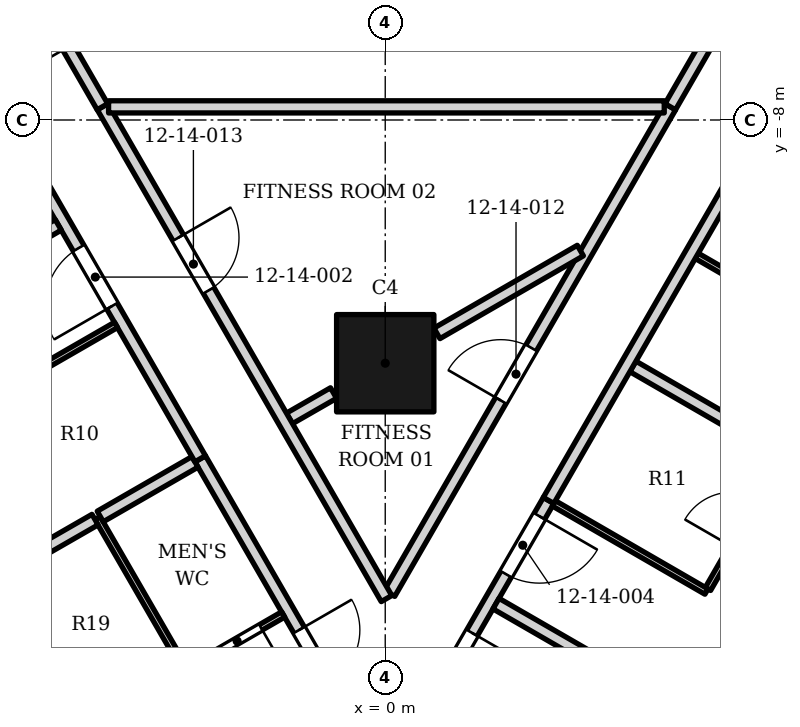
"""IFC4 building model, lengths in metres.
Left out: names, types, materials, properties, quantities, classifications, styles, units other than length and angle.
Written with IfcOpenShell. Run it as: python <this file> out.ifc"""

import sys

from ifc_helpers import new_model, si_unit, direction, frame, frame_2d, origin, origin_2d, place, context, subcontext, project, spatial, rectangle, extrude, element, fill, save


model = new_model("IFC4")
c1 = context("Model", 3, precision=1e-05, world=origin(), true_north=direction((0.0, 1.0)))
c2 = subcontext(c1, "Body", "Model", "MODEL_VIEW")
j1 = project(units=[si_unit("LENGTHUNIT", "METRE"), si_unit("PLANEANGLEUNIT", "RADIAN")], contexts=[c1])
p1 = place(None, origin())
s1 = spatial("IfcSite", under=j1, at=p1, CompositionType="ELEMENT")
p2 = place(p1, origin())
s2 = spatial("IfcBuilding", under=s1, at=p2, CompositionType="ELEMENT")
p3 = place(p2, frame((0.0, 0.0, 66.4)))
s3 = spatial("IfcBuildingStorey", under=s2, at=p3, CompositionType="ELEMENT", Elevation=66.4)
p4 = place(p3, frame((0.0, -12.0, 0.0), z_axis=(0.0, 0.0, 1.0), x_axis=(1.0, 0.0, 0.0)))
e1 = element("IfcColumn", 1, at=p4, inside=s3, PredefinedType="COLUMN", context=c2, shape_type="SweptSolid", body=[
    extrude(rectangle(XDim=1.6, YDim=1.6, at=origin_2d()), origin(), (0.0, 0.0, 1.0), 3.4),
])
p5 = place(p3, frame((0.02, -18.872, 0.0), z_axis=(0.0, 0.0, 1.0), x_axis=(0.500389767685, 0.865800254329, 0.0)))
e2 = element("IfcWall", 2, at=p5, inside=s3, PredefinedType="PARTITIONING", context=c2, shape_type="SweptSolid", body=[
    extrude(rectangle(XDim=5.33, YDim=0.2, at=frame_2d((2.665, 0.0))), origin(), (0.0, 0.0, 1.0), 2.628),
])
p6 = place(p5, frame((3.931, 0.0, 0.0)))
e3 = element("IfcOpeningElement", 3, at=p6, cuts=e2, PredefinedType="OPENING", context=c2, shape_type="SweptSolid", body=[
    extrude(rectangle(XDim=1.1, YDim=2.1, at=frame_2d((0.55, 1.05))), frame((0.0, 0.11, 0.0), z_axis=(0.0, -1.0, 0.0), x_axis=(1.0, 0.0, 0.0)), (0.0, 0.0, 1.0), 0.22),
])
p7 = place(p5, frame((1.715, 0.0, 0.0)))
e4 = element("IfcOpeningElement", 4, at=p7, cuts=e2, PredefinedType="OPENING", context=c2, shape_type="SweptSolid", body=[
    extrude(rectangle(XDim=1.1, YDim=2.1, at=frame_2d((0.55, 1.05))), frame((0.0, 0.11, 0.0), z_axis=(0.0, -1.0, 0.0), x_axis=(1.0, 0.0, 0.0)), (0.0, 0.0, 1.0), 0.22),
])
p8 = place(p3, frame((-6.421, -15.521, 0.0), z_axis=(0.0, 0.0, 1.0), x_axis=(0.499972122318, -0.866041498374, 0.0)))
e5 = element("IfcWall", 5, at=p8, inside=s3, PredefinedType="PARTITIONING", context=c2, shape_type="SweptSolid", body=[
    extrude(rectangle(XDim=2.85, YDim=0.1, at=frame_2d((1.425, 0.0))), origin(), (0.0, 0.0, 1.0), 3.23),
])
p9 = place(p3, frame((-3.042, -13.573, 0.0), z_axis=(0.0, 0.0, 1.0), x_axis=(0.49998522367, -0.866033934735, 0.0)))
e6 = element("IfcWall", 6, at=p9, inside=s3, PredefinedType="PARTITIONING", context=c2, shape_type="SweptSolid", body=[
    extrude(rectangle(XDim=4.397, YDim=0.2, at=frame_2d((2.198, 0.0))), origin(), (0.0, 0.0, 1.0), 3.23),
])
p10 = place(p9, frame((3.25, 0.0, 0.0)))
e7 = element("IfcOpeningElement", 7, at=p10, cuts=e6, PredefinedType="OPENING", context=c2, shape_type="SweptSolid", body=[
    extrude(rectangle(XDim=1.0, YDim=2.1, at=frame_2d((0.5, 1.05))), frame((0.0, 0.11, 0.0), z_axis=(0.0, -1.0, 0.0), x_axis=(1.0, 0.0, 0.0)), (0.0, 0.0, 1.0), 0.22),
])
p11 = place(p3, frame((-3.281, -17.056, 0.0), z_axis=(0.0, 0.0, 1.0), x_axis=(0.866058118026, 0.49994333299, 0.0)))
e8 = element("IfcWall", 8, at=p11, inside=s3, PredefinedType="PARTITIONING", context=c2, shape_type="SweptSolid", body=[
    extrude(rectangle(XDim=1.85, YDim=0.1, at=frame_2d((0.925, 0.0))), origin(), (0.0, 0.0, 1.0), 3.23),
])
p12 = place(p11, frame((0.525, 0.0, 0.0)))
e9 = element("IfcOpeningElement", 9, at=p12, cuts=e8, PredefinedType="OPENING", context=c2, shape_type="SweptSolid", body=[
    extrude(rectangle(XDim=0.9, YDim=2.1, at=frame_2d((0.45, 1.05))), frame((0.0, 0.06, 0.0), z_axis=(0.0, -1.0, 0.0), x_axis=(1.0, 0.0, 0.0)), (0.0, 0.0, 1.0), 0.12),
])
p13 = place(p3, frame((-4.732, -14.546, 0.0), z_axis=(0.0, 0.0, 1.0), x_axis=(0.499972122318, -0.866041498374, 0.0)))
e10 = element("IfcWall", 10, at=p13, inside=s3, PredefinedType="PARTITIONING", context=c2, shape_type="SweptSolid", body=[
    extrude(rectangle(XDim=2.85, YDim=0.1, at=frame_2d((1.425, 0.0))), origin(), (0.0, 0.0, 1.0), 2.552),
])
p14 = place(p3, frame((1.822, -15.954, 0.0), z_axis=(0.0, 0.0, 1.0), x_axis=(0.866029090493, -0.499993614378, 0.0)))
e11 = element("IfcWall", 11, at=p14, inside=s3, PredefinedType="PARTITIONING", context=c2, shape_type="SweptSolid", body=[
    extrude(rectangle(XDim=7.248, YDim=0.2, at=frame_2d((3.624, 0.0))), origin(), (0.0, 0.0, 1.0), 2.552),
])
p15 = place(p3, frame((0.069, -15.785, 0.0), z_axis=(0.0, 0.0, 1.0), x_axis=(0.499998459685, 0.866026293084, 0.0)))
e12 = element("IfcWall", 12, at=p15, inside=s3, PredefinedType="PARTITIONING", context=c2, shape_type="SweptSolid", body=[
    extrude(rectangle(XDim=9.239, YDim=0.2, at=frame_2d((4.62, 0.0))), origin(), (0.0, 0.0, 1.0), 2.302),
])
p16 = place(p15, frame((3.663, 0.0, 0.0)))
e13 = element("IfcOpeningElement", 13, at=p16, cuts=e12, PredefinedType="OPENING", context=c2, shape_type="SweptSolid", body=[
    extrude(rectangle(XDim=1.0, YDim=2.1, at=frame_2d((0.5, 1.05))), frame((0.0, 0.11, 0.0), z_axis=(0.0, -1.0, 0.0), x_axis=(1.0, 0.0, 0.0)), (0.0, 0.0, 1.0), 0.22),
])
p17 = place(p3, frame((5.308, -15.712, 0.0), z_axis=(0.0, 0.0, 1.0), x_axis=(0.500018594424, 0.866014668023, 0.0)))
e14 = element("IfcWall", 14, at=p17, inside=s3, PredefinedType="PARTITIONING", context=c2, shape_type="SweptSolid", body=[
    extrude(rectangle(XDim=2.45, YDim=0.1, at=frame_2d((1.225, 0.0))), origin(), (0.0, 0.0, 1.0), 3.23),
])
p18 = place(p17, frame((0.8, 0.0, 0.0)))
e15 = element("IfcOpeningElement", 15, at=p18, cuts=e14, PredefinedType="OPENING", context=c2, shape_type="SweptSolid", body=[
    extrude(rectangle(XDim=0.9, YDim=2.1, at=frame_2d((0.45, 1.05))), frame((0.0, 0.06, 0.0), z_axis=(0.0, -1.0, 0.0), x_axis=(1.0, 0.0, 0.0)), (0.0, 0.0, 1.0), 0.12),
])
p19 = place(p3, frame((-5.598, -15.046, 0.0), z_axis=(0.0, 0.0, 1.0), x_axis=(0.866787114338, 0.498678351664, 0.0)))
e16 = element("IfcWall", 16, at=p19, inside=s3, PredefinedType="PARTITIONING", context=c2, shape_type="SweptSolid", body=[
    extrude(rectangle(XDim=0.952, YDim=0.2, at=frame_2d((0.476, 0.0))), origin(), (0.0, 0.0, 1.0), 3.23),
])
p20 = place(p3, frame((2.772, -14.304, 0.0), z_axis=(0.0, 0.0, 1.0), x_axis=(0.865729701078, -0.500511822708, 0.0)))
e17 = element("IfcWall", 17, at=p20, inside=s3, PredefinedType="PARTITIONING", context=c2, shape_type="SweptSolid", body=[
    extrude(rectangle(XDim=2.9, YDim=0.1, at=frame_2d((1.45, 0.0))), origin(), (0.0, 0.0, 1.0), 2.552),
])
p21 = place(p3, frame((-4.687, -14.52, 0.0), z_axis=(0.0, 0.0, 1.0), x_axis=(0.866533485277, 0.499118942632, 0.0)))
e18 = element("IfcWall", 18, at=p21, inside=s3, PredefinedType="PARTITIONING", context=c2, shape_type="SweptSolid", body=[
    extrude(rectangle(XDim=1.798, YDim=0.2, at=frame_2d((0.899, 0.0))), origin(), (0.0, 0.0, 1.0), 2.552),
])
p22 = place(p3, frame((-12.043, 2.017, 0.0), z_axis=(0.0, 0.0, 1.0), x_axis=(0.5000018851, -0.866024315419, 0.0)))
e19 = element("IfcWall", 19, at=p22, inside=s3, PredefinedType="PARTITIONING", context=c2, shape_type="SweptSolid", body=[
    extrude(rectangle(XDim=18.0, YDim=0.2, at=frame_2d((9.0, 0.0))), origin(), (0.0, 0.0, 1.0), 2.374),
])
p23 = place(p22, frame((5.95, 0.0, 0.0)))
e20 = element("IfcOpeningElement", 20, at=p23, cuts=e19, PredefinedType="OPENING", context=c2, shape_type="SweptSolid", body=[
    extrude(rectangle(XDim=1.6, YDim=2.1, at=frame_2d((0.8, 1.05))), frame((0.0, 0.11, 0.0), z_axis=(0.0, -1.0, 0.0), x_axis=(1.0, 0.0, 0.0)), (0.0, 0.0, 1.0), 0.22),
])
p24 = place(p22, frame((14.0, 0.0, 0.0)))
e21 = element("IfcOpeningElement", 21, at=p24, cuts=e19, PredefinedType="OPENING", context=c2, shape_type="SweptSolid", body=[
    extrude(rectangle(XDim=1.1, YDim=2.1, at=frame_2d((0.55, 1.05))), frame((0.0, 0.11, 0.0), z_axis=(0.0, -1.0, 0.0), x_axis=(1.0, 0.0, 0.0)), (0.0, 0.0, 1.0), 0.22),
])
p25 = place(p3, frame((-1.576, -12.908, 0.0), z_axis=(0.0, 0.0, 1.0), x_axis=(0.866912601189, 0.498460170825, 0.0)))
e22 = element("IfcWall", 22, at=p25, inside=s3, PredefinedType="PARTITIONING", context=c2, shape_type="SweptSolid", body=[
    extrude(rectangle(XDim=0.838, YDim=0.2, at=frame_2d((0.419, 0.0))), origin(), (0.0, 0.0, 1.0), 3.23),
])
p26 = place(p3, frame((4.072, -12.052, 0.0), z_axis=(0.0, 0.0, 1.0), x_axis=(0.865900080757, -0.500217003055, 0.0)))
e23 = element("IfcWall", 23, at=p26, inside=s3, PredefinedType="PARTITIONING", context=c2, shape_type="SweptSolid", body=[
    extrude(rectangle(XDim=7.25, YDim=0.2, at=frame_2d((3.625, 0.0))), origin(), (0.0, 0.0, 1.0), 2.302),
])
p27 = place(p3, frame((0.85, -11.509, 0.0), z_axis=(0.0, 0.0, 1.0), x_axis=(0.865994487098, 0.500053545449, 0.0)))
e24 = element("IfcWall", 24, at=p27, inside=s3, PredefinedType="PARTITIONING", context=c2, shape_type="SweptSolid", body=[
    extrude(rectangle(XDim=2.723, YDim=0.2, at=frame_2d((1.362, 0.0))), origin(), (0.0, 0.0, 1.0), 3.23),
])
p28 = place(p3, frame((-6.94, -12.818, 0.0), z_axis=(0.0, 0.0, 1.0), x_axis=(0.866314505181, 0.49949892704, 0.0)))
e25 = element("IfcWall", 25, at=p28, inside=s3, PredefinedType="PARTITIONING", context=c2, shape_type="SweptSolid", body=[
    extrude(rectangle(XDim=2.9, YDim=0.1, at=frame_2d((1.45, 0.0))), origin(), (0.0, 0.0, 1.0), 2.374),
])
p29 = place(p3, frame((5.122, -10.234, 0.0), z_axis=(0.0, 0.0, 1.0), x_axis=(0.86575844616, -0.500462099367, 0.0)))
e26 = element("IfcWall", 26, at=p29, inside=s3, PredefinedType="PARTITIONING", context=c2, shape_type="SweptSolid", body=[
    extrude(rectangle(XDim=2.8, YDim=0.1, at=frame_2d((1.4, 0.0))), origin(), (0.0, 0.0, 1.0), 3.23),
])
p30 = place(p3, frame((-10.791, -12.848, 0.0), z_axis=(0.0, 0.0, 1.0), x_axis=(0.866170627668, 0.499748380452, 0.0)))
e27 = element("IfcWall", 27, at=p30, inside=s3, PredefinedType="PARTITIONING", context=c2, shape_type="SweptSolid", body=[
    extrude(rectangle(XDim=6.25, YDim=0.2, at=frame_2d((3.125, 0.0))), origin(), (0.0, 0.0, 1.0), 2.374),
])
p31 = place(p3, frame((-4.649, -7.782, 0.0), z_axis=(0.0, 0.0, 1.0), x_axis=(0.500018878653, -0.866014503915, 0.0)))
e28 = element("IfcWall", 28, at=p31, inside=s3, PredefinedType="PARTITIONING", context=c2, shape_type="SweptSolid", body=[
    extrude(rectangle(XDim=9.34, YDim=0.2, at=frame_2d((4.67, 0.0))), origin(), (0.0, 0.0, 1.0), 2.374),
])
p32 = place(p31, frame((2.488, 0.0, 0.0)))
e29 = element("IfcOpeningElement", 29, at=p32, cuts=e28, PredefinedType="OPENING", context=c2, shape_type="SweptSolid", body=[
    extrude(rectangle(XDim=1.0, YDim=2.1, at=frame_2d((0.5, 1.05))), frame((0.0, 0.11, 0.0), z_axis=(0.0, -1.0, 0.0), x_axis=(1.0, 0.0, 0.0)), (0.0, 0.0, 1.0), 0.22),
])
p33 = place(p3, frame((-4.55, -7.784, 0.0), z_axis=(0.0, 0.0, 1.0), x_axis=(1.0, 0.0, 0.0)))
e30 = element("IfcWall", 30, at=p33, inside=s3, PredefinedType="PARTITIONING", context=c2, shape_type="SweptSolid", body=[
    extrude(rectangle(XDim=9.138, YDim=0.2, at=frame_2d((4.569, 0.0))), origin(), (0.0, 0.0, 1.0), 2.384),
])
p34 = place(p3, frame((4.688, -7.782, 0.0), z_axis=(0.0, 0.0, 1.0), x_axis=(0.499996438971, 0.866027459735, 0.0)))
e31 = element("IfcWall", 31, at=p34, inside=s3, PredefinedType="PARTITIONING", context=c2, shape_type="SweptSolid", body=[
    extrude(rectangle(XDim=8.073, YDim=0.2, at=frame_2d((4.037, 0.0))), origin(), (0.0, 0.0, 1.0), 2.384),
])
p35 = place(p3, frame((-8.686, -0.79, 0.0), z_axis=(0.0, 0.0, 1.0), x_axis=(0.499814962183, -0.866132209064, 0.0)))
e32 = element("IfcWall", 32, at=p35, inside=s3, PredefinedType="PARTITIONING", context=c2, shape_type="SweptSolid", body=[
    extrude(rectangle(XDim=8.072, YDim=0.2, at=frame_2d((4.036, 0.0))), origin(), (0.0, 0.0, 1.0), 2.384),
])
p36 = place(p35, frame((5.939, 0.0, 0.0)))
e33 = element("IfcOpeningElement", 33, at=p36, cuts=e32, PredefinedType="OPENING", context=c2, shape_type="SweptSolid", body=[
    extrude(rectangle(XDim=1.0, YDim=2.1, at=frame_2d((0.5, 1.05))), frame((0.0, 0.11, 0.0), z_axis=(0.0, -1.0, 0.0), x_axis=(1.0, 0.0, 0.0)), (0.0, 0.0, 1.0), 0.22),
])
p37 = place(p35, frame((2.657, 0.0, 0.0)))
e34 = element("IfcOpeningElement", 34, at=p37, cuts=e32, PredefinedType="OPENING", context=c2, shape_type="SweptSolid", body=[
    extrude(rectangle(XDim=1.0, YDim=2.1, at=frame_2d((0.5, 1.05))), frame((0.0, 0.11, 0.0), z_axis=(0.0, -1.0, 0.0), x_axis=(1.0, 0.0, 0.0)), (0.0, 0.0, 1.0), 0.22),
])
p38 = place(p3, frame((2.686, -14.257, 0.0), z_axis=(0.0, 0.0, 1.0), x_axis=(0.49998850195, 0.866032042085, 0.0)))
e35 = element("IfcWall", 35, at=p38, inside=s3, PredefinedType="PARTITIONING", context=c2, shape_type="SweptSolid", body=[
    extrude(rectangle(XDim=20.6, YDim=0.2, at=frame_2d((10.3, 0.0))), origin(), (0.0, 0.0, 1.0), 2.302),
])
p39 = place(p38, frame((9.7, 0.0, 0.0)))
e36 = element("IfcOpeningElement", 36, at=p39, cuts=e35, PredefinedType="OPENING", context=c2, shape_type="SweptSolid", body=[
    extrude(rectangle(XDim=1.1, YDim=2.1, at=frame_2d((0.55, 1.05))), frame((0.0, 0.11, 0.0), z_axis=(0.0, -1.0, 0.0), x_axis=(1.0, 0.0, 0.0)), (0.0, 0.0, 1.0), 0.22),
])
p40 = place(p38, frame((15.6, 0.0, 0.0)))
e37 = element("IfcOpeningElement", 37, at=p40, cuts=e35, PredefinedType="OPENING", context=c2, shape_type="SweptSolid", body=[
    extrude(rectangle(XDim=1.0, YDim=2.1, at=frame_2d((0.5, 1.05))), frame((0.0, 0.11, 0.0), z_axis=(0.0, -1.0, 0.0), x_axis=(1.0, 0.0, 0.0)), (0.0, 0.0, 1.0), 0.22),
])
p41 = place(p24, origin())
e38 = element("IfcDoor", 38, at=p41, inside=s3, OperationType="SINGLE_SWING_RIGHT", PredefinedType="DOOR", context=c2, shape_type="SweptSolid", body=[
    extrude(rectangle(XDim=1.1, YDim=2.1, at=frame_2d((0.55, 1.05))), frame((0.0, 0.025, 0.0), z_axis=(0.0, -1.0, 0.0), x_axis=(1.0, 0.0, 0.0)), (0.0, 0.0, 1.0), 0.05),
])
fill(e21, e38)
p42 = place(p6, origin())
e39 = element("IfcDoor", 39, at=p42, inside=s3, OperationType="SINGLE_SWING_RIGHT", PredefinedType="DOOR", context=c2, shape_type="SweptSolid", body=[
    extrude(rectangle(XDim=1.1, YDim=2.1, at=frame_2d((0.55, 1.05))), frame((0.0, 0.025, 0.0), z_axis=(0.0, -1.0, 0.0), x_axis=(1.0, 0.0, 0.0)), (0.0, 0.0, 1.0), 0.05),
])
fill(e3, e39)
p43 = place(p16, origin())
e40 = element("IfcDoor", 40, at=p43, inside=s3, OperationType="SINGLE_SWING_LEFT", PredefinedType="DOOR", context=c2, shape_type="SweptSolid", body=[
    extrude(rectangle(XDim=1.0, YDim=2.1, at=frame_2d((0.5, 1.05))), frame((0.0, 0.025, 0.0), z_axis=(0.0, -1.0, 0.0), x_axis=(1.0, 0.0, 0.0)), (0.0, 0.0, 1.0), 0.05),
])
fill(e13, e40)
p44 = place(p32, origin())
e41 = element("IfcDoor", 41, at=p44, inside=s3, OperationType="SINGLE_SWING_LEFT", PredefinedType="DOOR", context=c2, shape_type="SweptSolid", body=[
    extrude(rectangle(XDim=1.0, YDim=2.1, at=frame_2d((0.5, 1.05))), frame((0.0, 0.025, 0.0), z_axis=(0.0, -1.0, 0.0), x_axis=(1.0, 0.0, 0.0)), (0.0, 0.0, 1.0), 0.05),
])
fill(e29, e41)
p45 = place(p10, origin())
e42 = element("IfcDoor", 42, at=p45, inside=s3, OperationType="SINGLE_SWING_LEFT", PredefinedType="DOOR", context=c2, shape_type="SweptSolid", body=[
    extrude(rectangle(XDim=1.0, YDim=2.1, at=frame_2d((0.5, 1.05))), frame((0.0, 0.025, 0.0), z_axis=(0.0, -1.0, 0.0), x_axis=(1.0, 0.0, 0.0)), (0.0, 0.0, 1.0), 0.05),
])
fill(e7, e42)
p46 = place(p12, origin())
e43 = element("IfcDoor", 43, at=p46, inside=s3, OperationType="SINGLE_SWING_RIGHT", PredefinedType="DOOR", context=c2, shape_type="SweptSolid", body=[
    extrude(rectangle(XDim=0.9, YDim=2.1, at=frame_2d((0.45, 1.05))), frame((0.0, 0.025, 0.0), z_axis=(0.0, -1.0, 0.0), x_axis=(1.0, 0.0, 0.0)), (0.0, 0.0, 1.0), 0.05),
])
fill(e9, e43)
p47 = place(p7, origin())
e44 = element("IfcDoor", 44, at=p47, inside=s3, OperationType="SINGLE_SWING_RIGHT", PredefinedType="DOOR", context=c2, shape_type="SweptSolid", body=[
    extrude(rectangle(XDim=1.1, YDim=2.1, at=frame_2d((0.55, 1.05))), frame((0.0, 0.025, 0.0), z_axis=(0.0, -1.0, 0.0), x_axis=(1.0, 0.0, 0.0)), (0.0, 0.0, 1.0), 0.05),
])
fill(e4, e44)
save(model, sys.argv[1])
